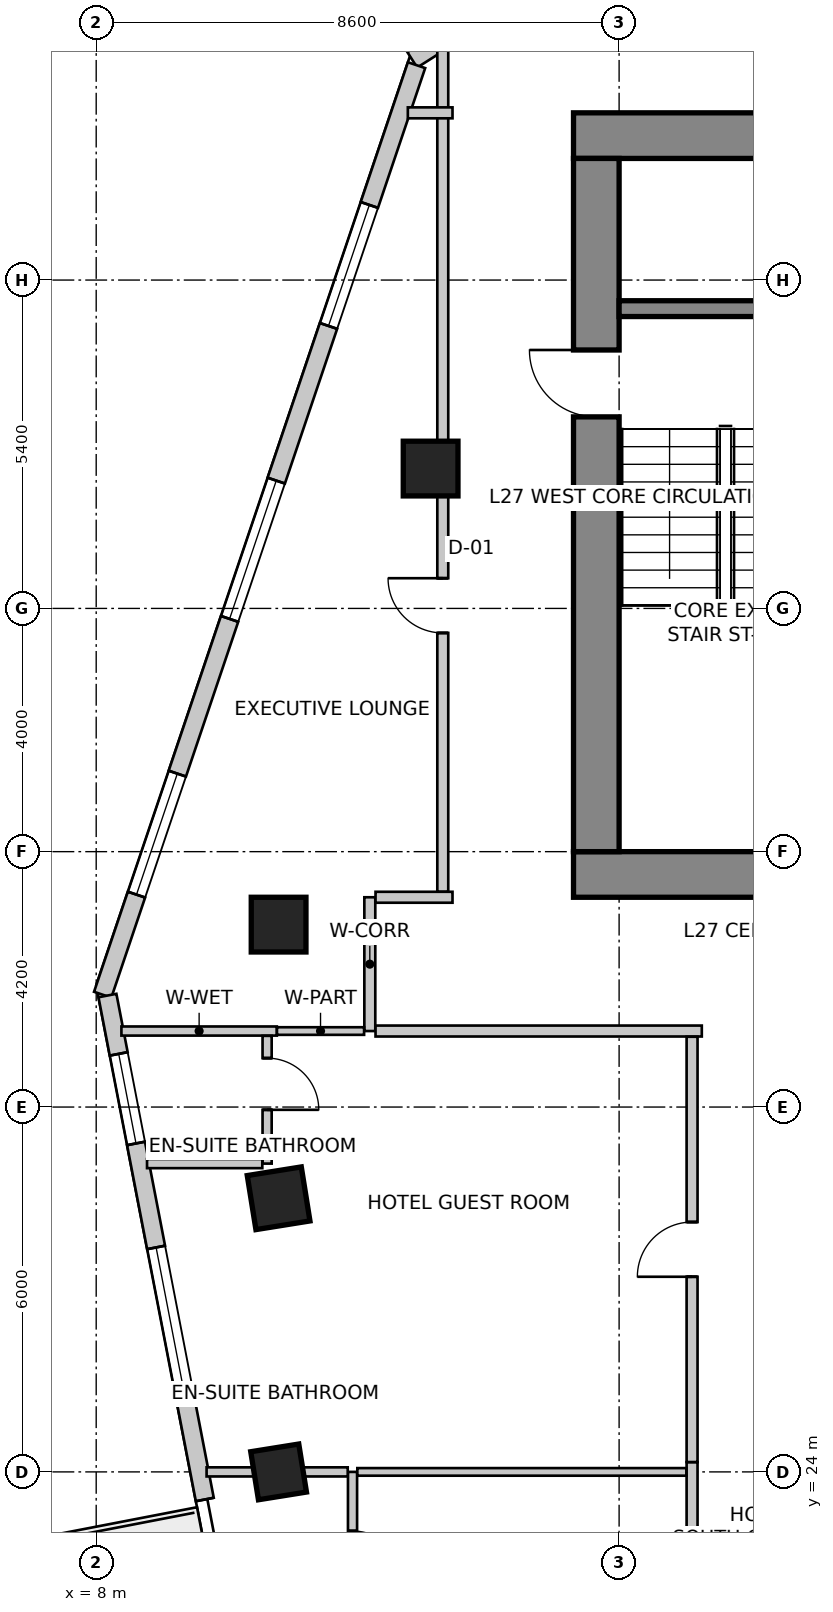
"""IFC4 building model, lengths in metres.
Left out: names, types, materials, properties, quantities, classifications, styles, units other than length and angle.
Written with IfcOpenShell. Run it as: python <this file> out.ifc"""

import sys

from ifc_helpers import new_model, si_unit, direction, frame, frame_2d, origin, origin_2d, place, context, subcontext, project, spatial, rectangle, extrude, source, transform, mapped, element, fill, save


model = new_model("IFC4")
c1 = context("Model", 3, precision=1e-05, world=origin(), true_north=direction((0.0, 1.0)))
c2 = subcontext(c1, "Body", "Model", "MODEL_VIEW")
j1 = project(units=[si_unit("LENGTHUNIT", "METRE"), si_unit("PLANEANGLEUNIT", "RADIAN")], contexts=[c1])
p1 = place(None, origin())
s1 = spatial("IfcSite", under=j1, at=p1, CompositionType="ELEMENT")
p2 = place(p1, origin())
s2 = spatial("IfcBuilding", under=s1, at=p2, CompositionType="ELEMENT")
p3 = place(p2, frame((0.0, 0.0, 114.2)))
s3 = spatial("IfcBuildingStorey", under=s2, at=p3, CompositionType="ELEMENT", Elevation=114.2)
p4 = place(p3, frame((15.85, 45.975, 0.0), z_axis=(0.0, 0.0, 1.0), x_axis=(1.0, 0.0, 0.0)))
e1 = element("IfcWall", 1, at=p4, inside=s3, PredefinedType="SHEAR", context=c2, shape_type="SweptSolid", body=[
    extrude(rectangle(XDim=15.9, YDim=0.75, at=frame_2d((7.95, 0.0))), origin(), (0.0, 0.0, 1.0), 3.6),
])
p5 = place(p3, frame((15.85, 33.825, 0.0), z_axis=(0.0, 0.0, 1.0), x_axis=(1.0, 0.0, 0.0)))
e2 = element("IfcWall", 2, at=p5, inside=s3, PredefinedType="SHEAR", context=c2, shape_type="SweptSolid", body=[
    extrude(rectangle(XDim=15.9, YDim=0.75, at=frame_2d((7.95, 0.0))), origin(), (0.0, 0.0, 1.0), 3.6),
])
m1 = source(origin(), c2, "Body", "SweptSolid", [
    extrude(rectangle(XDim=1.3, YDim=2.15, at=frame_2d((0.65, 1.075))), frame((0.0, 0.385, 0.0), z_axis=(0.0, -1.0, 0.0), x_axis=(1.0, 0.0, 0.0)), (0.0, 0.0, 1.0), 0.77),
])
p6 = place(p5, frame((10.08, 0.0, 0.0)))
e3 = element("IfcOpeningElement", 3, at=p6, cuts=e2, PredefinedType="OPENING", context=c2, shape_type="MappedRepresentation", body=[
    mapped(m1, transform((0.0, 0.0, 0.0), scale=1.0)),
])
p7 = place(p3, frame((16.225, 34.2, 0.0), z_axis=(0.0, 0.0, 1.0), x_axis=(0.0, 1.0, 0.0)))
e4 = element("IfcWall", 4, at=p7, inside=s3, PredefinedType="SHEAR", context=c2, shape_type="SweptSolid", body=[
    extrude(rectangle(XDim=11.4, YDim=0.75, at=frame_2d((5.7, 0.0))), origin(), (0.0, 0.0, 1.0), 3.6),
])
m2 = source(origin(), c2, "Body", "SweptSolid", [
    extrude(rectangle(XDim=1.1, YDim=2.15, at=frame_2d((0.55, 1.075))), frame((0.0, 0.385, 0.0), z_axis=(0.0, -1.0, 0.0), x_axis=(1.0, 0.0, 0.0)), (0.0, 0.0, 1.0), 0.77),
])
p8 = place(p7, frame((7.15, 0.0, 0.0)))
e5 = element("IfcOpeningElement", 5, at=p8, cuts=e4, PredefinedType="OPENING", context=c2, shape_type="MappedRepresentation", body=[
    mapped(m2, transform((0.0, 0.0, 0.0), scale=1.0)),
])
p9 = place(p3, frame((16.6, 43.13, 0.0), z_axis=(0.0, 0.0, 1.0), x_axis=(1.0, 0.0, 0.0)))
e6 = element("IfcWall", 6, at=p9, inside=s3, PredefinedType="SHEAR", context=c2, shape_type="SweptSolid", body=[
    extrude(rectangle(XDim=3.5, YDim=0.26, at=frame_2d((1.75, 0.0))), origin(), (0.0, 0.0, 1.0), 3.6),
])
m3 = source(origin(), c2, "Body", "SweptSolid", [
    extrude(rectangle(XDim=0.9, YDim=0.9, at=origin_2d()), origin(), (0.0, 0.0, 1.0), 3.6),
])
for number, where, z_axis, x_axis in (
    (7, (11.0, 33.0, 0.0), (0.0, 0.0, 1.0), (1.0, 0.0, 0.0)),
    (8, (13.5, 40.5, 0.0), (0.0, 0.0, 1.0), (1.0, 0.0, 0.0)),
    (9, (11.0, 28.5, 0.0), (0.0, 0.0, 1.0), (0.158, -0.987, 0.0)),
):
    element("IfcColumn", number, at=place(p3, frame(where, z_axis=z_axis, x_axis=x_axis)), inside=s3, PredefinedType="COLUMN", context=c2, shape_type="MappedRepresentation", body=[
        mapped(m3, transform((0.0, 0.0, 0.0), scale=1.0)),
    ])
m4 = source(origin(), c2, "Body", "SweptSolid", [
    extrude(rectangle(XDim=0.8, YDim=0.8, at=origin_2d()), origin(), (0.0, 0.0, 1.0), 3.6),
])
p10 = place(p3, frame((11.0, 24.0, 0.0), z_axis=(0.0, 0.0, 1.0), x_axis=(0.158158067254, -0.987413806751, 0.0)))
e10 = element("IfcColumn", 10, at=p10, inside=s3, PredefinedType="COLUMN", context=c2, shape_type="MappedRepresentation", body=[
    mapped(m4, transform((0.0, 0.0, 0.0), scale=1.0)),
])
p11 = place(p3, frame((21.875, 52.742, 0.0), z_axis=(0.0, 0.0, 1.0), x_axis=(-0.843662465249, -0.536873956092, 0.0)))
e11 = element("IfcWall", 11, at=p11, inside=s3, PredefinedType="SOLIDWALL", context=c2, shape_type="SweptSolid", body=[
    extrude(rectangle(XDim=10.284, YDim=0.3, at=frame_2d((5.142, 0.0))), origin(), (0.0, 0.0, 1.0), 3.35),
])
m5 = source(origin(), c2, "Body", "SweptSolid", [
    extrude(rectangle(XDim=2.4, YDim=2.2, at=frame_2d((1.2, 1.1))), frame((0.0, 0.16, 0.0), z_axis=(0.0, -1.0, 0.0), x_axis=(1.0, 0.0, 0.0)), (0.0, 0.0, 1.0), 0.32),
])
p12 = place(p11, frame((2.656, 0.0, 0.85)))
e12 = element("IfcOpeningElement", 12, at=p12, cuts=e11, PredefinedType="OPENING", context=c2, shape_type="MappedRepresentation", body=[
    mapped(m5, transform((0.0, 0.0, 0.0), scale=1.0)),
])
m6 = source(origin(), c2, "Body", "SweptSolid", [
    extrude(rectangle(XDim=1.5, YDim=1.8, at=frame_2d((0.75, 0.9))), frame((0.0, 0.16, 0.0), z_axis=(0.0, -1.0, 0.0), x_axis=(1.0, 0.0, 0.0)), (0.0, 0.0, 1.0), 0.32),
])
p13 = place(p11, frame((7.937, 0.0, 0.85)))
e13 = element("IfcOpeningElement", 13, at=p13, cuts=e11, PredefinedType="OPENING", context=c2, shape_type="MappedRepresentation", body=[
    mapped(m6, transform((0.0, 0.0, 0.0), scale=1.0)),
])
p14 = place(p3, frame((13.269, 47.134, 0.0), z_axis=(0.0, 0.0, 1.0), x_axis=(-0.319929596295, -0.947441319246, 0.0)))
e14 = element("IfcWall", 14, at=p14, inside=s3, PredefinedType="SOLIDWALL", context=c2, shape_type="SweptSolid", body=[
    extrude(rectangle(XDim=16.134, YDim=0.3, at=frame_2d((8.067, 0.0))), origin(), (0.0, 0.0, 1.0), 3.35),
])
m7 = source(origin(), c2, "Body", "SweptSolid", [
    extrude(rectangle(XDim=2.1, YDim=2.0, at=frame_2d((1.05, 1.0))), frame((0.0, 0.16, 0.0), z_axis=(0.0, -1.0, 0.0), x_axis=(1.0, 0.0, 0.0)), (0.0, 0.0, 1.0), 0.32),
])
p15 = place(p14, frame((2.426, 0.0, 0.85)))
e15 = element("IfcOpeningElement", 15, at=p15, cuts=e14, PredefinedType="OPENING", context=c2, shape_type="MappedRepresentation", body=[
    mapped(m7, transform((0.0, 0.0, 0.0), scale=1.0)),
])
p16 = place(p14, frame((7.211, 0.0, 0.85)))
e16 = element("IfcOpeningElement", 16, at=p16, cuts=e14, PredefinedType="OPENING", context=c2, shape_type="MappedRepresentation", body=[
    mapped(m5, transform((0.0, 0.0, 0.0), scale=1.0)),
])
p17 = place(p14, frame((12.297, 0.0, 0.85)))
e17 = element("IfcOpeningElement", 17, at=p17, cuts=e14, PredefinedType="OPENING", context=c2, shape_type="MappedRepresentation", body=[
    mapped(m7, transform((0.0, 0.0, 0.0), scale=1.0)),
])
p18 = place(p3, frame((8.185, 31.834, 0.0), z_axis=(0.0, 0.0, 1.0), x_axis=(0.189707113148, -0.981840725994, 0.0)))
e18 = element("IfcWall", 18, at=p18, inside=s3, PredefinedType="SOLIDWALL", context=c2, shape_type="SweptSolid", body=[
    extrude(rectangle(XDim=21.221, YDim=0.3, at=frame_2d((10.611, 0.0))), origin(), (0.0, 0.0, 1.0), 3.35),
])
m8 = source(origin(), c2, "Body", "SweptSolid", [
    extrude(rectangle(XDim=1.6, YDim=2.15, at=frame_2d((0.8, 1.075))), frame((0.0, 0.16, 0.0), z_axis=(0.0, -1.0, 0.0), x_axis=(1.0, 0.0, 0.0)), (0.0, 0.0, 1.0), 0.32),
])
p19 = place(p18, frame((8.441, 0.0, 0.0)))
e19 = element("IfcOpeningElement", 19, at=p19, cuts=e18, PredefinedType="OPENING", context=c2, shape_type="MappedRepresentation", body=[
    mapped(m8, transform((0.0, 0.0, 0.0), scale=1.0)),
])
p20 = place(p18, frame((0.977, 0.0, 0.85)))
e20 = element("IfcOpeningElement", 20, at=p20, cuts=e18, PredefinedType="OPENING", context=c2, shape_type="MappedRepresentation", body=[
    mapped(m6, transform((0.0, 0.0, 0.0), scale=1.0)),
])
p21 = place(p18, frame((4.219, 0.0, 0.85)))
e21 = element("IfcOpeningElement", 21, at=p21, cuts=e18, PredefinedType="OPENING", context=c2, shape_type="MappedRepresentation", body=[
    mapped(m5, transform((0.0, 0.0, 0.0), scale=1.0)),
])
p22 = place(p18, frame((11.871, 0.0, 0.85)))
e22 = element("IfcOpeningElement", 22, at=p22, cuts=e18, PredefinedType="OPENING", context=c2, shape_type="MappedRepresentation", body=[
    mapped(m5, transform((0.0, 0.0, 0.0), scale=1.0)),
])
p23 = place(p18, frame((17.241, 0.0, 0.85)))
e23 = element("IfcOpeningElement", 23, at=p23, cuts=e18, PredefinedType="OPENING", context=c2, shape_type="MappedRepresentation", body=[
    mapped(m7, transform((0.0, 0.0, 0.0), scale=1.0)),
])
p24 = place(p3, frame((12.5, 31.25, 0.0), z_axis=(0.0, 0.0, 1.0), x_axis=(0.0, 1.0, 0.0)))
e24 = element("IfcWall", 24, at=p24, inside=s3, PredefinedType="PARTITIONING", context=c2, shape_type="SweptSolid", body=[
    extrude(rectangle(XDim=2.2, YDim=0.18, at=frame_2d((1.1, 0.0))), origin(), (0.0, 0.0, 1.0), 2.935),
])
p25 = place(p3, frame((12.594, 33.45, 0.0), z_axis=(0.0, 0.0, 1.0), x_axis=(1.0, 0.0, 0.0)))
e25 = element("IfcWall", 25, at=p25, inside=s3, PredefinedType="PARTITIONING", context=c2, shape_type="SweptSolid", body=[
    extrude(rectangle(XDim=1.266, YDim=0.18, at=frame_2d((0.633, 0.0))), origin(), (0.0, 0.0, 1.0), 3.35),
])
p26 = place(p3, frame((17.96, 31.25, 0.0), z_axis=(0.0, 0.0, 1.0), x_axis=(-1.0, 0.0, 0.0)))
e26 = element("IfcWall", 26, at=p26, inside=s3, PredefinedType="PARTITIONING", context=c2, shape_type="SweptSolid", body=[
    extrude(rectangle(XDim=5.366, YDim=0.18, at=frame_2d((2.683, 0.0))), origin(), (0.0, 0.0, 1.0), 2.935),
])
p27 = place(p3, frame((13.7, 33.544, 0.0), z_axis=(0.0, 0.0, 1.0), x_axis=(0.0, 1.0, 0.0)))
e27 = element("IfcWall", 27, at=p27, inside=s3, PredefinedType="PARTITIONING", context=c2, shape_type="SweptSolid", body=[
    extrude(rectangle(XDim=13.86, YDim=0.18, at=frame_2d((6.93, 0.0))), origin(), (0.0, 0.0, 1.0), 2.492),
])
m9 = source(origin(), c2, "Body", "SweptSolid", [
    extrude(rectangle(XDim=0.9, YDim=2.15, at=frame_2d((0.45, 1.075))), frame((0.0, 0.1, 0.0), z_axis=(0.0, -1.0, 0.0), x_axis=(1.0, 0.0, 0.0)), (0.0, 0.0, 1.0), 0.2),
])
p28 = place(p27, frame((4.253, 0.0, 0.0)))
e28 = element("IfcOpeningElement", 28, at=p28, cuts=e27, PredefinedType="OPENING", context=c2, shape_type="MappedRepresentation", body=[
    mapped(m9, transform((0.0, 0.0, 0.0), scale=1.0)),
])
p29 = place(p3, frame((13.86, 46.35, 0.0), z_axis=(0.0, 0.0, 1.0), x_axis=(-1.0, 0.0, 0.0)))
e29 = element("IfcWall", 29, at=p29, inside=s3, PredefinedType="PARTITIONING", context=c2, shape_type="SweptSolid", body=[
    extrude(rectangle(XDim=0.735, YDim=0.18, at=frame_2d((0.367, 0.0))), origin(), (0.0, 0.0, 1.0), 3.35),
])
p30 = place(p3, frame((10.971, 31.25, 0.0), z_axis=(0.0, 0.0, 1.0), x_axis=(-1.0, 0.0, 0.0)))
e30 = element("IfcWall", 30, at=p30, inside=s3, PredefinedType="PARTITIONING", context=c2, shape_type="SweptSolid", body=[
    extrude(rectangle(XDim=2.556, YDim=0.15, at=frame_2d((1.278, 0.0))), origin(), (0.0, 0.0, 1.0), 2.492),
])
p31 = place(p3, frame((12.406, 31.25, 0.0), z_axis=(0.0, 0.0, 1.0), x_axis=(-1.0, 0.0, 0.0)))
e31 = element("IfcWall", 31, at=p31, inside=s3, PredefinedType="PARTITIONING", context=c2, shape_type="SweptSolid", body=[
    extrude(rectangle(XDim=1.433, YDim=0.125, at=frame_2d((0.717, 0.0))), origin(), (0.0, 0.0, 1.0), 2.492),
])
p32 = place(p3, frame((17.8, 15.0, 0.0), z_axis=(0.0, 0.0, 1.0), x_axis=(0.0, 1.0, 0.0)))
e32 = element("IfcWall", 32, at=p32, inside=s3, PredefinedType="PARTITIONING", context=c2, shape_type="SweptSolid", body=[
    extrude(rectangle(XDim=9.16, YDim=0.18, at=frame_2d((4.58, 0.0))), origin(), (0.0, 0.0, 1.0), 2.492),
])
p33 = place(p32, frame((4.13, 0.0, 0.0)))
e33 = element("IfcOpeningElement", 33, at=p33, cuts=e32, PredefinedType="OPENING", context=c2, shape_type="MappedRepresentation", body=[
    mapped(m9, transform((0.0, 0.0, 0.0), scale=1.0)),
])
p34 = place(p3, frame((17.8, 24.162, 0.0), z_axis=(0.0, 0.0, 1.0), x_axis=(0.0, 1.0, 0.0)))
e34 = element("IfcWall", 34, at=p34, inside=s3, PredefinedType="PARTITIONING", context=c2, shape_type="SweptSolid", body=[
    extrude(rectangle(XDim=6.994, YDim=0.18, at=frame_2d((3.497, 0.0))), origin(), (0.0, 0.0, 1.0), 2.788),
])
p35 = place(p34, frame((3.047, 0.0, 0.0)))
e35 = element("IfcOpeningElement", 35, at=p35, cuts=e34, PredefinedType="OPENING", context=c2, shape_type="MappedRepresentation", body=[
    mapped(m9, transform((0.0, 0.0, 0.0), scale=1.0)),
])
p36 = place(p3, frame((12.216, 24.0, 0.0), z_axis=(0.0, 0.0, 1.0), x_axis=(0.0, -1.0, 0.0)))
e36 = element("IfcWall", 36, at=p36, inside=s3, PredefinedType="PARTITIONING", context=c2, shape_type="SweptSolid", body=[
    extrude(rectangle(XDim=2.2, YDim=0.15, at=frame_2d((1.1, 0.0))), origin(), (0.0, 0.0, 1.0), 2.788),
])
m10 = source(origin(), c2, "Body", "SweptSolid", [
    extrude(rectangle(XDim=0.85, YDim=2.15, at=frame_2d((0.425, 1.075))), frame((0.0, 0.085, 0.0), z_axis=(0.0, -1.0, 0.0), x_axis=(1.0, 0.0, 0.0)), (0.0, 0.0, 1.0), 0.17),
])
p37 = place(p36, frame((0.971, 0.0, 0.0)))
e37 = element("IfcOpeningElement", 37, at=p37, cuts=e36, PredefinedType="OPENING", context=c2, shape_type="MappedRepresentation", body=[
    mapped(m10, transform((0.0, 0.0, 0.0), scale=1.0)),
])
p38 = place(p3, frame((9.816, 24.0, 0.0), z_axis=(0.0, 0.0, 1.0), x_axis=(1.0, 0.0, 0.0)))
e38 = element("IfcWall", 38, at=p38, inside=s3, PredefinedType="PARTITIONING", context=c2, shape_type="SweptSolid", body=[
    extrude(rectangle(XDim=2.321, YDim=0.15, at=frame_2d((1.161, 0.0))), origin(), (0.0, 0.0, 1.0), 2.492),
])
p39 = place(p3, frame((12.295, 24.0, 0.0), z_axis=(0.0, 0.0, 1.0), x_axis=(1.0, 0.0, 0.0)))
e39 = element("IfcWall", 39, at=p39, inside=s3, PredefinedType="PARTITIONING", context=c2, shape_type="SweptSolid", body=[
    extrude(rectangle(XDim=5.411, YDim=0.125, at=frame_2d((2.706, 0.0))), origin(), (0.0, 0.0, 1.0), 2.803),
])
p40 = place(p3, frame((10.811, 31.171, 0.0), z_axis=(0.0, 0.0, 1.0), x_axis=(0.0, -1.0, 0.0)))
e40 = element("IfcWall", 40, at=p40, inside=s3, PredefinedType="PARTITIONING", context=c2, shape_type="SweptSolid", body=[
    extrude(rectangle(XDim=2.101, YDim=0.15, at=frame_2d((1.05, 0.0))), origin(), (0.0, 0.0, 1.0), 2.492),
])
p41 = place(p40, frame((0.366, 0.0, 0.0)))
e41 = element("IfcOpeningElement", 41, at=p41, cuts=e40, PredefinedType="OPENING", context=c2, shape_type="MappedRepresentation", body=[
    mapped(m10, transform((0.0, 0.0, 0.0), scale=1.0)),
])
p42 = place(p3, frame((10.732, 29.07, 0.0), z_axis=(0.0, 0.0, 1.0), x_axis=(-1.0, 0.0, 0.0)))
e42 = element("IfcWall", 42, at=p42, inside=s3, PredefinedType="PARTITIONING", context=c2, shape_type="SweptSolid", body=[
    extrude(rectangle(XDim=1.896, YDim=0.15, at=frame_2d((0.948, 0.0))), origin(), (0.0, 0.0, 1.0), 3.35),
])
m11 = source(origin(), c2, "Body", "SweptSolid", [
    extrude(rectangle(XDim=2.1, YDim=2.0, at=frame_2d((1.05, 1.0))), frame((0.0, -0.015, 0.0), z_axis=(0.0, -1.0, 0.0), x_axis=(1.0, 0.0, 0.0)), (0.0, 0.0, 1.0), 0.06),
])
p43 = place(p15, origin())
e43 = element("IfcWindow", 43, at=p43, inside=s3, PartitioningType="SINGLE_PANEL", PredefinedType="WINDOW", context=c2, shape_type="MappedRepresentation", body=[
    mapped(m11, transform((0.0, 0.0, 0.0), scale=1.0)),
])
fill(e15, e43)
m12 = source(origin(), c2, "Body", "SweptSolid", [
    extrude(rectangle(XDim=2.4, YDim=2.2, at=frame_2d((1.2, 1.1))), frame((0.0, -0.015, 0.0), z_axis=(0.0, -1.0, 0.0), x_axis=(1.0, 0.0, 0.0)), (0.0, 0.0, 1.0), 0.06),
])
p44 = place(p16, origin())
e44 = element("IfcWindow", 44, at=p44, inside=s3, PartitioningType="SINGLE_PANEL", PredefinedType="WINDOW", context=c2, shape_type="MappedRepresentation", body=[
    mapped(m12, transform((0.0, 0.0, 0.0), scale=1.0)),
])
fill(e16, e44)
p45 = place(p17, origin())
e45 = element("IfcWindow", 45, at=p45, inside=s3, PartitioningType="SINGLE_PANEL", PredefinedType="WINDOW", context=c2, shape_type="MappedRepresentation", body=[
    mapped(m11, transform((0.0, 0.0, 0.0), scale=1.0)),
])
fill(e17, e45)
m13 = source(origin(), c2, "Body", "SweptSolid", [
    extrude(rectangle(XDim=1.6, YDim=2.15, at=frame_2d((0.8, 1.075))), frame((0.0, 0.025, 0.0), z_axis=(0.0, -1.0, 0.0), x_axis=(1.0, 0.0, 0.0)), (0.0, 0.0, 1.0), 0.05),
])
p46 = place(p19, origin())
e46 = element("IfcDoor", 46, at=p46, inside=s3, OperationType="DOUBLE_DOOR_SLIDING", PredefinedType="DOOR", context=c2, shape_type="MappedRepresentation", body=[
    mapped(m13, transform((0.0, 0.0, 0.0), scale=1.0)),
])
fill(e19, e46)
m14 = source(origin(), c2, "Body", "SweptSolid", [
    extrude(rectangle(XDim=1.5, YDim=1.8, at=frame_2d((0.75, 0.9))), frame((0.0, -0.015, 0.0), z_axis=(0.0, -1.0, 0.0), x_axis=(1.0, 0.0, 0.0)), (0.0, 0.0, 1.0), 0.06),
])
p47 = place(p20, origin())
e47 = element("IfcWindow", 47, at=p47, inside=s3, PartitioningType="SINGLE_PANEL", PredefinedType="WINDOW", context=c2, shape_type="MappedRepresentation", body=[
    mapped(m14, transform((0.0, 0.0, 0.0), scale=1.0)),
])
fill(e20, e47)
p48 = place(p21, origin())
e48 = element("IfcWindow", 48, at=p48, inside=s3, PartitioningType="SINGLE_PANEL", PredefinedType="WINDOW", context=c2, shape_type="MappedRepresentation", body=[
    mapped(m12, transform((0.0, 0.0, 0.0), scale=1.0)),
])
fill(e21, e48)
m15 = source(origin(), c2, "Body", "SweptSolid", [
    extrude(rectangle(XDim=1.1, YDim=2.15, at=frame_2d((0.55, 1.075))), frame((0.0, 0.025, 0.0), z_axis=(0.0, -1.0, 0.0), x_axis=(1.0, 0.0, 0.0)), (0.0, 0.0, 1.0), 0.05),
])
p49 = place(p8, origin())
e49 = element("IfcDoor", 49, at=p49, inside=s3, OperationType="SINGLE_SWING_RIGHT", PredefinedType="DOOR", context=c2, shape_type="MappedRepresentation", body=[
    mapped(m15, transform((0.0, 0.0, 0.0), scale=1.0)),
])
fill(e5, e49)
m16 = source(origin(), c2, "Body", "SweptSolid", [
    extrude(rectangle(XDim=0.9, YDim=2.15, at=frame_2d((0.45, 1.075))), frame((0.0, 0.025, 0.0), z_axis=(0.0, -1.0, 0.0), x_axis=(1.0, 0.0, 0.0)), (0.0, 0.0, 1.0), 0.05),
])
p50 = place(p28, origin())
e50 = element("IfcDoor", 50, at=p50, inside=s3, OperationType="SINGLE_SWING_RIGHT", PredefinedType="DOOR", context=c2, shape_type="MappedRepresentation", body=[
    mapped(m16, transform((0.0, 0.0, 0.0), scale=1.0)),
])
fill(e28, e50)
m17 = source(origin(), c2, "Body", "SweptSolid", [
    extrude(rectangle(XDim=0.85, YDim=2.15, at=frame_2d((0.425, 1.075))), frame((0.0, 0.025, 0.0), z_axis=(0.0, -1.0, 0.0), x_axis=(1.0, 0.0, 0.0)), (0.0, 0.0, 1.0), 0.05),
])
p51 = place(p37, origin())
e51 = element("IfcDoor", 51, at=p51, inside=s3, OperationType="SINGLE_SWING_RIGHT", PredefinedType="DOOR", context=c2, shape_type="MappedRepresentation", body=[
    mapped(m17, transform((0.0, 0.0, 0.0), scale=1.0)),
])
fill(e37, e51)
p52 = place(p41, origin())
e52 = element("IfcDoor", 52, at=p52, inside=s3, OperationType="SINGLE_SWING_RIGHT", PredefinedType="DOOR", context=c2, shape_type="MappedRepresentation", body=[
    mapped(m17, transform((0.0, 0.0, 0.0), scale=1.0)),
])
fill(e41, e52)
m18 = source(origin(), c2, "Body", "SweptSolid", [
    extrude(rectangle(XDim=0.9, YDim=2.15, at=frame_2d((0.45, 1.075))), frame((0.0, 0.025, 0.0), z_axis=(0.0, -1.0, 0.0), x_axis=(1.0, 0.0, 0.0)), (0.0, 0.0, 1.0), 0.05),
])
p53 = place(p35, origin())
e53 = element("IfcDoor", 53, at=p53, inside=s3, OperationType="SINGLE_SWING_LEFT", PredefinedType="DOOR", context=c2, shape_type="MappedRepresentation", body=[
    mapped(m18, transform((0.0, 0.0, 0.0), scale=1.0)),
])
fill(e35, e53)
save(model, sys.argv[1])
